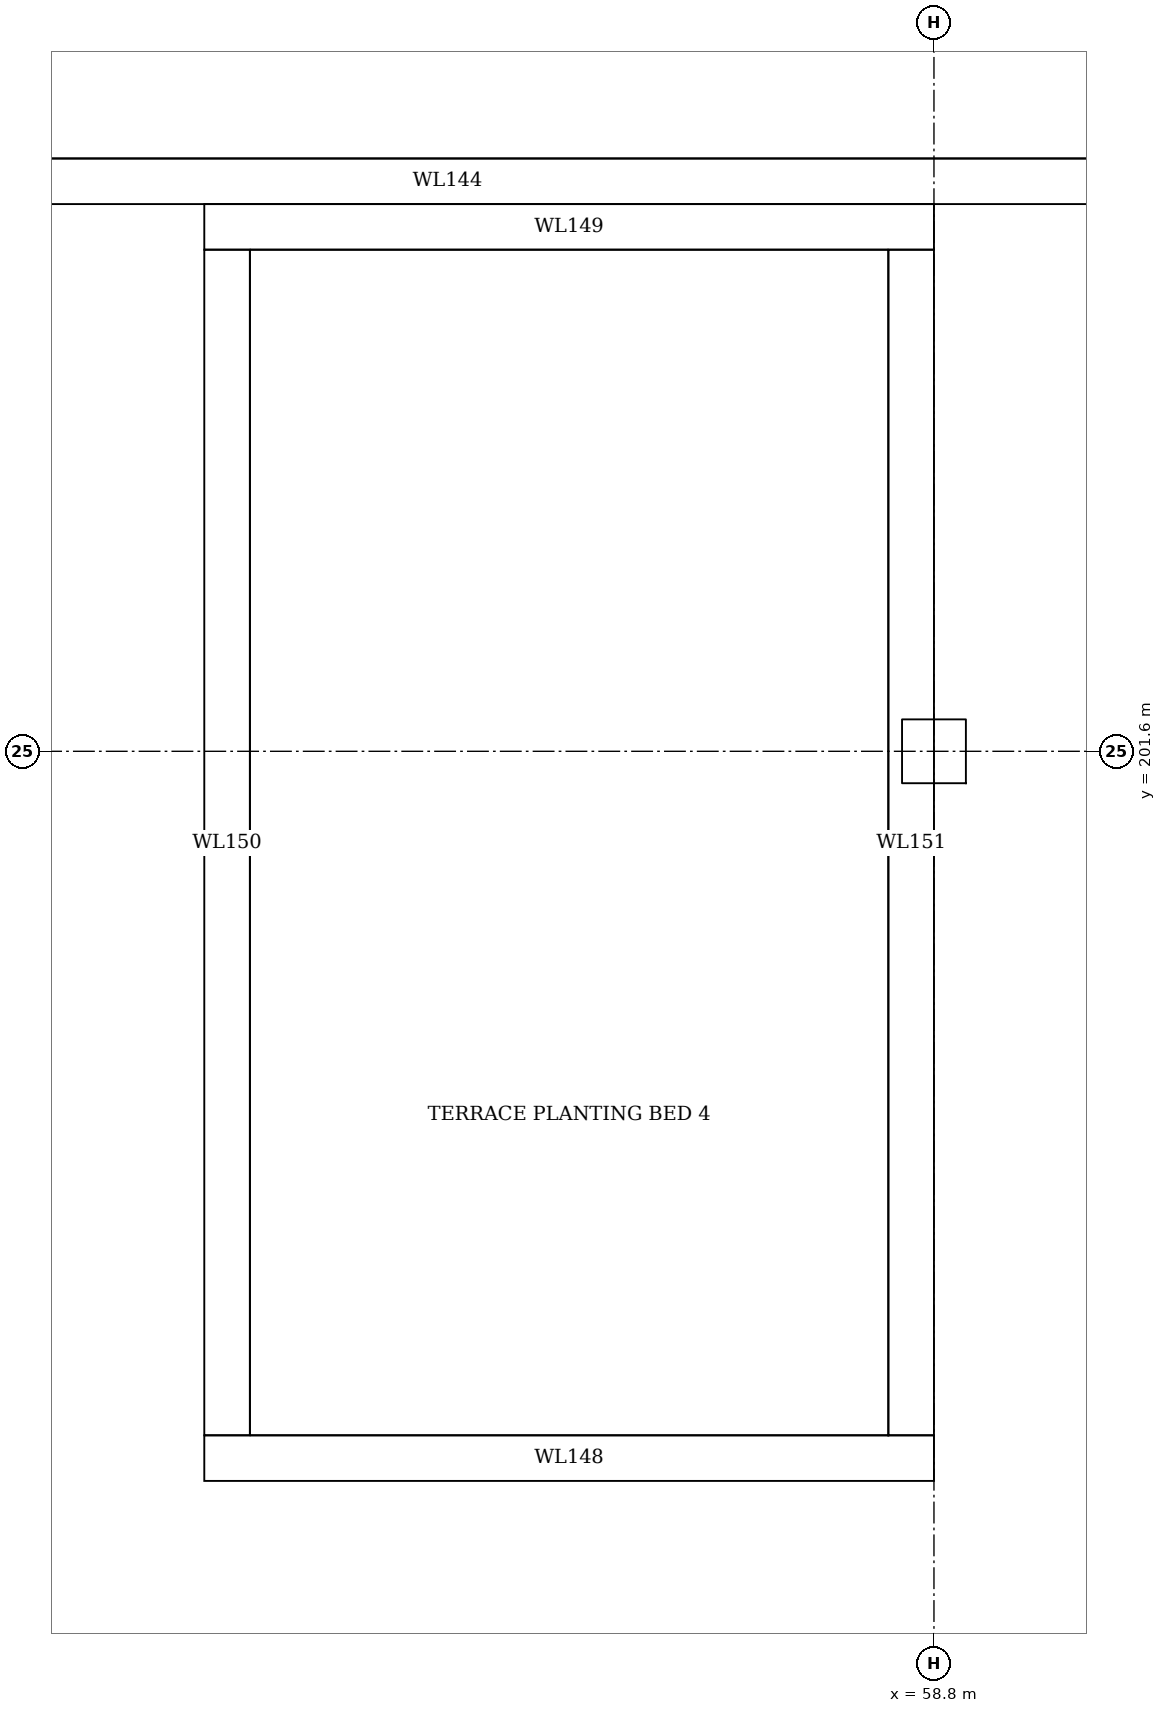
"""IFC4 building model, lengths in metres.
Left out: names, types, materials, properties, quantities, classifications, styles, units other than length and angle.
Written with IfcOpenShell. Run it as: python <this file> out.ifc"""

import sys

from ifc_helpers import new_model, si_unit, direction, frame, frame_2d, origin, place, context, subcontext, project, spatial, rectangle, extrude, element, save


model = new_model("IFC4")
c1 = context("Model", 3, precision=1e-05, world=origin(), true_north=direction((0.0, 1.0)))
c2 = subcontext(c1, "Body", "Model", "MODEL_VIEW")
j1 = project(units=[si_unit("LENGTHUNIT", "METRE"), si_unit("PLANEANGLEUNIT", "RADIAN")], contexts=[c1])
p1 = place(None, origin())
s1 = spatial("IfcSite", under=j1, at=p1, CompositionType="ELEMENT")
p2 = place(p1, origin())
s2 = spatial("IfcBuilding", under=s1, at=p2, CompositionType="ELEMENT")
p3 = place(p2, frame((0.0, 0.0, 17.1)))
s3 = spatial("IfcBuildingStorey", under=s2, at=p3, CompositionType="ELEMENT", Elevation=17.1)
p4 = place(p3, frame((50.4, 205.35, 0.0), z_axis=(0.0, 0.0, 1.0), x_axis=(1.0, 0.0, 0.0)))
e1 = element("IfcWall", 1, at=p4, inside=s3, PredefinedType="SOLIDWALL", context=c2, shape_type="SweptSolid", body=[
    extrude(rectangle(XDim=10.4, YDim=0.3, at=frame_2d((5.2, 0.0))), origin(), (0.0, 0.0, 1.0), 0.6),
])
for number, where, z_axis, x_axis in (
    (2, (54.0, 196.95, 0.0), (0.0, 0.0, 1.0), (1.0, 0.0, 0.0)),
    (3, (54.0, 205.05, 0.0), (0.0, 0.0, 1.0), (1.0, 0.0, 0.0)),
):
    element("IfcWall", number, at=place(p3, frame(where, z_axis=z_axis, x_axis=x_axis)), inside=s3, PredefinedType="SOLIDWALL", context=c2, shape_type="SweptSolid", body=[
        extrude(rectangle(XDim=4.8, YDim=0.3, at=frame_2d((2.4, 0.0))), origin(), (0.0, 0.0, 1.0), 0.6),
    ])
for number, where, z_axis, x_axis in (
    (4, (54.15, 197.1, 0.0), (0.0, 0.0, 1.0), (0.0, 1.0, 0.0)),
    (5, (58.65, 197.1, 0.0), (0.0, 0.0, 1.0), (0.0, 1.0, 0.0)),
):
    element("IfcWall", number, at=place(p3, frame(where, z_axis=z_axis, x_axis=x_axis)), inside=s3, PredefinedType="SOLIDWALL", context=c2, shape_type="SweptSolid", body=[
        extrude(rectangle(XDim=7.8, YDim=0.3, at=frame_2d((3.9, 0.0))), origin(), (0.0, 0.0, 1.0), 0.6),
    ])
save(model, sys.argv[1])
